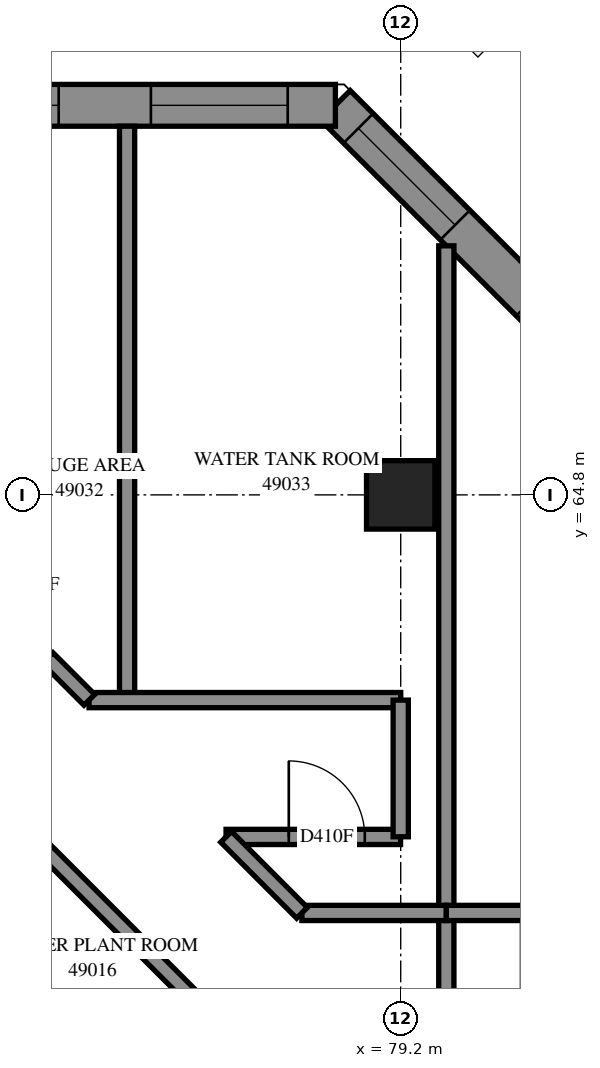
"""IFC4 building model, lengths in metres.
Left out: names, types, materials, properties, quantities, classifications, styles, units other than length and angle.
Written with IfcOpenShell. Run it as: python <this file> out.ifc"""

import sys

from ifc_helpers import new_model, si_unit, direction, frame, frame_2d, origin, origin_2d, place, context, subcontext, project, spatial, polyline, rectangle, outline, extrude, element, fill, save


model = new_model("IFC4")
c1 = context("Model", 3, precision=1e-05, world=origin(), true_north=direction((0.0, 1.0)))
c2 = subcontext(c1, "Body", "Model", "MODEL_VIEW")
j1 = project(units=[si_unit("LENGTHUNIT", "METRE"), si_unit("PLANEANGLEUNIT", "RADIAN")], contexts=[c1])
p1 = place(None, origin())
s1 = spatial("IfcSite", under=j1, at=p1, CompositionType="ELEMENT")
p2 = place(p1, origin())
s2 = spatial("IfcBuilding", under=s1, at=p2, CompositionType="ELEMENT")
p3 = place(p2, frame((0.0, 0.0, 180.4)))
s3 = spatial("IfcBuildingStorey", under=s2, at=p3, CompositionType="ELEMENT", Elevation=180.4)
p4 = place(p3, frame((79.2, 64.8, 0.0), z_axis=(0.0, 0.0, 1.0), x_axis=(1.0, 0.0, 0.0)))
e1 = element("IfcColumn", 1, at=p4, inside=s3, PredefinedType="COLUMN", context=c2, shape_type="SweptSolid", body=[
    extrude(rectangle(XDim=0.9, YDim=0.9, at=origin_2d()), origin(), (0.0, 0.0, 1.0), 4.7),
])
p5 = place(p3, frame((76.46, 49.284, -0.3), z_axis=(0.0, 0.0, 1.0), x_axis=(0.7071067812, 0.7071067812, 0.0)))
e2 = element("IfcWall", 2, at=p5, inside=s3, PredefinedType="SHEAR", context=c2, shape_type="SweptSolid", body=[
    extrude(rectangle(XDim=14.4, YDim=0.55, at=frame_2d((7.2, 0.0))), origin(), (0.0, 0.0, 1.0), 4.3),
])
p6 = place(p5, frame((4.55, 0.0, 0.3)))
e3 = element("IfcOpeningElement", 3, at=p6, cuts=e2, PredefinedType="OPENING", context=c2, shape_type="SweptSolid", body=[
    extrude(rectangle(XDim=1.1, YDim=2.1, at=frame_2d((0.55, 1.05))), frame((0.0, 0.285, 0.0), z_axis=(0.0, -1.0, 0.0), x_axis=(1.0, 0.0, 0.0)), (0.0, 0.0, 1.0), 0.57),
])
p7 = place(p5, frame((11.35, 0.0, 0.3)))
e4 = element("IfcOpeningElement", 4, at=p7, cuts=e2, PredefinedType="OPENING", context=c2, shape_type="SweptSolid", body=[
    extrude(rectangle(XDim=1.1, YDim=2.1, at=frame_2d((0.55, 1.05))), frame((0.0, 0.285, 0.0), z_axis=(0.0, -1.0, 0.0), x_axis=(1.0, 0.0, 0.0)), (0.0, 0.0, 1.0), 0.57),
])
p8 = place(p3, frame((100.024, 48.241, 0.0), z_axis=(0.0, 0.0, 1.0), x_axis=(-0.7071067812, 0.7071067812, 0.0)))
e5 = element("IfcWall", 5, at=p8, inside=s3, PredefinedType="SOLIDWALL", context=c2, shape_type="SweptSolid", body=[
    extrude(outline(polyline([(-0.275, -0.275), (30.779, -0.275), (30.552, 0.275), (0.275, 0.275), (-0.275, -0.275)])), origin(), (0.0, 0.0, 1.0), 4.7),
])
p9 = place(p8, frame((3.625, 0.0, 0.9)))
e6 = element("IfcOpeningElement", 6, at=p9, cuts=e5, PredefinedType="OPENING", context=c2, shape_type="SweptSolid", body=[
    extrude(rectangle(XDim=1.8, YDim=3.6, at=frame_2d((0.9, 1.8))), frame((0.0, 0.285, 0.0), z_axis=(0.0, -1.0, 0.0), x_axis=(1.0, 0.0, 0.0)), (0.0, 0.0, 1.0), 0.57),
])
p10 = place(p8, frame((7.225, 0.0, 0.9)))
e7 = element("IfcOpeningElement", 7, at=p10, cuts=e5, PredefinedType="OPENING", context=c2, shape_type="SweptSolid", body=[
    extrude(rectangle(XDim=1.8, YDim=3.6, at=frame_2d((0.9, 1.8))), frame((0.0, 0.285, 0.0), z_axis=(0.0, -1.0, 0.0), x_axis=(1.0, 0.0, 0.0)), (0.0, 0.0, 1.0), 0.57),
])
p11 = place(p8, frame((10.825, 0.0, 0.9)))
e8 = element("IfcOpeningElement", 8, at=p11, cuts=e5, PredefinedType="OPENING", context=c2, shape_type="SweptSolid", body=[
    extrude(rectangle(XDim=1.8, YDim=3.6, at=frame_2d((0.9, 1.8))), frame((0.0, 0.285, 0.0), z_axis=(0.0, -1.0, 0.0), x_axis=(1.0, 0.0, 0.0)), (0.0, 0.0, 1.0), 0.57),
])
p12 = place(p8, frame((14.425, 0.0, 0.9)))
e9 = element("IfcOpeningElement", 9, at=p12, cuts=e5, PredefinedType="OPENING", context=c2, shape_type="SweptSolid", body=[
    extrude(rectangle(XDim=1.8, YDim=3.6, at=frame_2d((0.9, 1.8))), frame((0.0, 0.285, 0.0), z_axis=(0.0, -1.0, 0.0), x_axis=(1.0, 0.0, 0.0)), (0.0, 0.0, 1.0), 0.57),
])
p13 = place(p8, frame((17.575, 0.0, 0.9)))
e10 = element("IfcOpeningElement", 10, at=p13, cuts=e5, PredefinedType="OPENING", context=c2, shape_type="SweptSolid", body=[
    extrude(rectangle(XDim=1.8, YDim=3.6, at=frame_2d((0.9, 1.8))), frame((0.0, 0.285, 0.0), z_axis=(0.0, -1.0, 0.0), x_axis=(1.0, 0.0, 0.0)), (0.0, 0.0, 1.0), 0.57),
])
p14 = place(p8, frame((21.625, 0.0, 0.9)))
e11 = element("IfcOpeningElement", 11, at=p14, cuts=e5, PredefinedType="OPENING", context=c2, shape_type="SweptSolid", body=[
    extrude(rectangle(XDim=1.8, YDim=3.6, at=frame_2d((0.9, 1.8))), frame((0.0, 0.285, 0.0), z_axis=(0.0, -1.0, 0.0), x_axis=(1.0, 0.0, 0.0)), (0.0, 0.0, 1.0), 0.57),
])
p15 = place(p8, frame((25.225, 0.0, 0.9)))
e12 = element("IfcOpeningElement", 12, at=p15, cuts=e5, PredefinedType="OPENING", context=c2, shape_type="SweptSolid", body=[
    extrude(rectangle(XDim=1.8, YDim=3.6, at=frame_2d((0.9, 1.8))), frame((0.0, 0.285, 0.0), z_axis=(0.0, -1.0, 0.0), x_axis=(1.0, 0.0, 0.0)), (0.0, 0.0, 1.0), 0.57),
])
p16 = place(p8, frame((28.438, 0.0, 0.9)))
e13 = element("IfcOpeningElement", 13, at=p16, cuts=e5, PredefinedType="OPENING", context=c2, shape_type="SweptSolid", body=[
    extrude(rectangle(XDim=1.8, YDim=3.6, at=frame_2d((0.9, 1.8))), frame((0.0, 0.285, 0.0), z_axis=(0.0, -1.0, 0.0), x_axis=(1.0, 0.0, 0.0)), (0.0, 0.0, 1.0), 0.57),
])
p17 = place(p3, frame((78.341, 69.925, 0.0), z_axis=(0.0, 0.0, 1.0), x_axis=(-1.0, 0.0, 0.0)))
e14 = element("IfcWall", 14, at=p17, inside=s3, PredefinedType="SOLIDWALL", context=c2, shape_type="SweptSolid", body=[
    extrude(outline(polyline([(-0.114, -0.275), (54.941, -0.275), (54.391, 0.275), (0.114, 0.275), (-0.114, -0.275)])), origin(), (0.0, 0.0, 1.0), 4.7),
])
p18 = place(p17, frame((0.627, 0.0, 0.9)))
e15 = element("IfcOpeningElement", 15, at=p18, cuts=e14, PredefinedType="OPENING", context=c2, shape_type="SweptSolid", body=[
    extrude(rectangle(XDim=1.8, YDim=3.6, at=frame_2d((0.9, 1.8))), frame((0.0, 0.285, 0.0), z_axis=(0.0, -1.0, 0.0), x_axis=(1.0, 0.0, 0.0)), (0.0, 0.0, 1.0), 0.57),
])
p19 = place(p17, frame((3.64, 0.0, 0.9)))
e16 = element("IfcOpeningElement", 16, at=p19, cuts=e14, PredefinedType="OPENING", context=c2, shape_type="SweptSolid", body=[
    extrude(rectangle(XDim=1.8, YDim=3.6, at=frame_2d((0.9, 1.8))), frame((0.0, 0.285, 0.0), z_axis=(0.0, -1.0, 0.0), x_axis=(1.0, 0.0, 0.0)), (0.0, 0.0, 1.0), 0.57),
])
p20 = place(p17, frame((7.24, 0.0, 0.9)))
e17 = element("IfcOpeningElement", 17, at=p20, cuts=e14, PredefinedType="OPENING", context=c2, shape_type="SweptSolid", body=[
    extrude(rectangle(XDim=1.8, YDim=3.6, at=frame_2d((0.9, 1.8))), frame((0.0, 0.285, 0.0), z_axis=(0.0, -1.0, 0.0), x_axis=(1.0, 0.0, 0.0)), (0.0, 0.0, 1.0), 0.57),
])
p21 = place(p17, frame((10.841, 0.0, 0.9)))
e18 = element("IfcOpeningElement", 18, at=p21, cuts=e14, PredefinedType="OPENING", context=c2, shape_type="SweptSolid", body=[
    extrude(rectangle(XDim=1.8, YDim=3.6, at=frame_2d((0.9, 1.8))), frame((0.0, 0.285, 0.0), z_axis=(0.0, -1.0, 0.0), x_axis=(1.0, 0.0, 0.0)), (0.0, 0.0, 1.0), 0.57),
])
p22 = place(p17, frame((14.441, 0.0, 0.9)))
e19 = element("IfcOpeningElement", 19, at=p22, cuts=e14, PredefinedType="OPENING", context=c2, shape_type="SweptSolid", body=[
    extrude(rectangle(XDim=1.8, YDim=3.6, at=frame_2d((0.9, 1.8))), frame((0.0, 0.285, 0.0), z_axis=(0.0, -1.0, 0.0), x_axis=(1.0, 0.0, 0.0)), (0.0, 0.0, 1.0), 0.57),
])
p23 = place(p17, frame((18.041, 0.0, 0.9)))
e20 = element("IfcOpeningElement", 20, at=p23, cuts=e14, PredefinedType="OPENING", context=c2, shape_type="SweptSolid", body=[
    extrude(rectangle(XDim=1.8, YDim=3.6, at=frame_2d((0.9, 1.8))), frame((0.0, 0.285, 0.0), z_axis=(0.0, -1.0, 0.0), x_axis=(1.0, 0.0, 0.0)), (0.0, 0.0, 1.0), 0.57),
])
p24 = place(p17, frame((21.64, 0.0, 0.9)))
e21 = element("IfcOpeningElement", 21, at=p24, cuts=e14, PredefinedType="OPENING", context=c2, shape_type="SweptSolid", body=[
    extrude(rectangle(XDim=1.8, YDim=3.6, at=frame_2d((0.9, 1.8))), frame((0.0, 0.285, 0.0), z_axis=(0.0, -1.0, 0.0), x_axis=(1.0, 0.0, 0.0)), (0.0, 0.0, 1.0), 0.57),
])
p25 = place(p17, frame((25.241, 0.0, 0.9)))
e22 = element("IfcOpeningElement", 22, at=p25, cuts=e14, PredefinedType="OPENING", context=c2, shape_type="SweptSolid", body=[
    extrude(rectangle(XDim=1.8, YDim=3.6, at=frame_2d((0.9, 1.8))), frame((0.0, 0.285, 0.0), z_axis=(0.0, -1.0, 0.0), x_axis=(1.0, 0.0, 0.0)), (0.0, 0.0, 1.0), 0.57),
])
p26 = place(p17, frame((28.84, 0.0, 0.9)))
e23 = element("IfcOpeningElement", 23, at=p26, cuts=e14, PredefinedType="OPENING", context=c2, shape_type="SweptSolid", body=[
    extrude(rectangle(XDim=1.8, YDim=3.6, at=frame_2d((0.9, 1.8))), frame((0.0, 0.285, 0.0), z_axis=(0.0, -1.0, 0.0), x_axis=(1.0, 0.0, 0.0)), (0.0, 0.0, 1.0), 0.57),
])
p27 = place(p17, frame((32.441, 0.0, 0.9)))
e24 = element("IfcOpeningElement", 24, at=p27, cuts=e14, PredefinedType="OPENING", context=c2, shape_type="SweptSolid", body=[
    extrude(rectangle(XDim=1.8, YDim=3.6, at=frame_2d((0.9, 1.8))), frame((0.0, 0.285, 0.0), z_axis=(0.0, -1.0, 0.0), x_axis=(1.0, 0.0, 0.0)), (0.0, 0.0, 1.0), 0.57),
])
p28 = place(p17, frame((36.041, 0.0, 0.9)))
e25 = element("IfcOpeningElement", 25, at=p28, cuts=e14, PredefinedType="OPENING", context=c2, shape_type="SweptSolid", body=[
    extrude(rectangle(XDim=1.8, YDim=3.6, at=frame_2d((0.9, 1.8))), frame((0.0, 0.285, 0.0), z_axis=(0.0, -1.0, 0.0), x_axis=(1.0, 0.0, 0.0)), (0.0, 0.0, 1.0), 0.57),
])
p29 = place(p17, frame((39.641, 0.0, 0.9)))
e26 = element("IfcOpeningElement", 26, at=p29, cuts=e14, PredefinedType="OPENING", context=c2, shape_type="SweptSolid", body=[
    extrude(rectangle(XDim=1.8, YDim=3.6, at=frame_2d((0.9, 1.8))), frame((0.0, 0.285, 0.0), z_axis=(0.0, -1.0, 0.0), x_axis=(1.0, 0.0, 0.0)), (0.0, 0.0, 1.0), 0.57),
])
p30 = place(p17, frame((43.24, 0.0, 0.9)))
e27 = element("IfcOpeningElement", 27, at=p30, cuts=e14, PredefinedType="OPENING", context=c2, shape_type="SweptSolid", body=[
    extrude(rectangle(XDim=1.8, YDim=3.6, at=frame_2d((0.9, 1.8))), frame((0.0, 0.285, 0.0), z_axis=(0.0, -1.0, 0.0), x_axis=(1.0, 0.0, 0.0)), (0.0, 0.0, 1.0), 0.57),
])
p31 = place(p17, frame((46.84, 0.0, 0.9)))
e28 = element("IfcOpeningElement", 28, at=p31, cuts=e14, PredefinedType="OPENING", context=c2, shape_type="SweptSolid", body=[
    extrude(rectangle(XDim=1.8, YDim=3.6, at=frame_2d((0.9, 1.8))), frame((0.0, 0.285, 0.0), z_axis=(0.0, -1.0, 0.0), x_axis=(1.0, 0.0, 0.0)), (0.0, 0.0, 1.0), 0.57),
])
p32 = place(p17, frame((50.441, 0.0, 0.9)))
e29 = element("IfcOpeningElement", 29, at=p32, cuts=e14, PredefinedType="OPENING", context=c2, shape_type="SweptSolid", body=[
    extrude(rectangle(XDim=1.8, YDim=3.6, at=frame_2d((0.9, 1.8))), frame((0.0, 0.285, 0.0), z_axis=(0.0, -1.0, 0.0), x_axis=(1.0, 0.0, 0.0)), (0.0, 0.0, 1.0), 0.57),
])
p33 = place(p3, frame((102.747, 49.938, 0.0), z_axis=(0.0, 0.0, 1.0), x_axis=(-0.7071083109, 0.7071052514, 0.0)))
e30 = element("IfcWall", 30, at=p33, inside=s3, PredefinedType="SOLIDWALL", context=c2, shape_type="SweptSolid", body=[
    extrude(outline(polyline([(-0.1, -0.1), (32.726, -0.1), (32.644, 0.1), (0.1, 0.1), (-0.1, -0.1)])), origin(), (0.0, 0.0, 1.0), 4.7),
])
p34 = place(p3, frame((79.8, 59.3, 0.0), z_axis=(0.0, 0.0, 1.0), x_axis=(0.0, 1.0, 0.0)))
e31 = element("IfcWall", 31, at=p34, inside=s3, PredefinedType="PARTITIONING", context=c2, shape_type="SweptSolid", body=[
    extrude(rectangle(XDim=8.777, YDim=0.2, at=frame_2d((4.388, 0.0))), origin(), (0.0, 0.0, 1.0), 4.7),
])
p35 = place(p3, frame((75.6, 62.1, 0.0), z_axis=(0.0, 0.0, 1.0), x_axis=(0.0, 1.0, 0.0)))
e32 = element("IfcWall", 32, at=p35, inside=s3, PredefinedType="PARTITIONING", context=c2, shape_type="SweptSolid", body=[
    extrude(rectangle(XDim=7.55, YDim=0.2, at=frame_2d((3.775, 0.0))), origin(), (0.0, 0.0, 1.0), 4.7),
])
p36 = place(p3, frame((74.349, 60.299, 0.0), z_axis=(0.0, 0.0, 1.0), x_axis=(0.7071067812, -0.7071067812, 0.0)))
e33 = element("IfcWall", 33, at=p36, inside=s3, PredefinedType="PARTITIONING", context=c2, shape_type="SweptSolid", body=[
    extrude(rectangle(XDim=4.452, YDim=0.2, at=frame_2d((2.226, 0.0))), origin(), (0.0, 0.0, 1.0), 4.7),
])
p37 = place(p3, frame((75.1, 62.1, 0.0), z_axis=(0.0, 0.0, 1.0), x_axis=(1.0, 0.0, 0.0)))
e34 = element("IfcWall", 34, at=p37, inside=s3, PredefinedType="PARTITIONING", context=c2, shape_type="SweptSolid", body=[
    extrude(rectangle(XDim=4.1, YDim=0.2, at=frame_2d((2.05, 0.0))), origin(), (0.0, 0.0, 1.0), 4.7),
])
p38 = place(p3, frame((79.8, 55.844, 0.0), z_axis=(0.0, 0.0, 1.0), x_axis=(0.0, 1.0, 0.0)))
e35 = element("IfcWall", 35, at=p38, inside=s3, PredefinedType="PARTITIONING", context=c2, shape_type="SweptSolid", body=[
    extrude(rectangle(XDim=3.456, YDim=0.2, at=frame_2d((1.728, 0.0))), origin(), (0.0, 0.0, 1.0), 4.7),
])
p39 = place(p3, frame((76.902, 60.3, 0.0), z_axis=(0.0, 0.0, 1.0), x_axis=(1.0, 0.0, 0.0)))
e36 = element("IfcWall", 36, at=p39, inside=s3, PredefinedType="PARTITIONING", context=c2, shape_type="SweptSolid", body=[
    extrude(rectangle(XDim=2.296, YDim=0.2, at=frame_2d((1.148, 0.0))), origin(), (0.0, 0.0, 1.0), 4.7),
])
p40 = place(p39, frame((0.825, 0.0, 0.0)))
e37 = element("IfcOpeningElement", 37, at=p40, cuts=e36, PredefinedType="OPENING", context=c2, shape_type="SweptSolid", body=[
    extrude(rectangle(XDim=1.0, YDim=2.1, at=frame_2d((0.5, 1.05))), frame((0.0, 0.11, 0.0), z_axis=(0.0, -1.0, 0.0), x_axis=(1.0, 0.0, 0.0)), (0.0, 0.0, 1.0), 0.22),
])
p41 = place(p3, frame((77.9, 59.3, 0.0), z_axis=(0.0, 0.0, 1.0), x_axis=(1.0, 0.0, 0.0)))
e38 = element("IfcWall", 38, at=p41, inside=s3, PredefinedType="PARTITIONING", context=c2, shape_type="SweptSolid", body=[
    extrude(rectangle(XDim=1.9, YDim=0.2, at=frame_2d((0.95, 0.0))), origin(), (0.0, 0.0, 1.0), 4.7),
])
p42 = place(p3, frame((79.2, 60.302, 0.0), z_axis=(0.0, 0.0, 1.0), x_axis=(0.0, 1.0, 0.0)))
e39 = element("IfcWall", 39, at=p42, inside=s3, PredefinedType="PARTITIONING", context=c2, shape_type="SweptSolid", body=[
    extrude(rectangle(XDim=1.798, YDim=0.2, at=frame_2d((0.899, 0.0))), origin(), (0.0, 0.0, 1.0), 4.7),
])
p43 = place(p3, frame((76.903, 60.301, 0.0), z_axis=(0.0, 0.0, 1.0), x_axis=(0.7063986127, -0.7078142412, 0.0)))
e40 = element("IfcWall", 40, at=p43, inside=s3, PredefinedType="PARTITIONING", context=c2, shape_type="SweptSolid", body=[
    extrude(rectangle(XDim=1.413, YDim=0.2, at=frame_2d((0.706, 0.0))), origin(), (0.0, 0.0, 1.0), 4.7),
])
p44 = place(p3, frame((79.8, 59.3, 0.0), z_axis=(0.0, 0.0, 1.0), x_axis=(1.0, 0.0, 0.0)))
e41 = element("IfcWall", 41, at=p44, inside=s3, PredefinedType="PARTITIONING", context=c2, shape_type="SweptSolid", body=[
    extrude(rectangle(XDim=1.098, YDim=0.2, at=frame_2d((0.549, 0.0))), origin(), (0.0, 0.0, 1.0), 4.7),
])
p45 = place(p3, frame((74.553, 62.654, 0.0), z_axis=(0.0, 0.0, 1.0), x_axis=(0.7071067812, -0.7071067812, 0.0)))
e42 = element("IfcWall", 42, at=p45, inside=s3, PredefinedType="PARTITIONING", context=c2, shape_type="SweptSolid", body=[
    extrude(rectangle(XDim=0.778, YDim=0.2, at=frame_2d((0.389, 0.0))), origin(), (0.0, 0.0, 1.0), 4.7),
])
p46 = place(p16, origin())
e43 = element("IfcWindow", 43, at=p46, inside=s3, PartitioningType="SINGLE_PANEL", PredefinedType="WINDOW", context=c2, shape_type="SweptSolid", body=[
    extrude(rectangle(XDim=1.8, YDim=3.6, at=frame_2d((0.9, 1.8))), frame((0.0, 0.155, 0.0), z_axis=(0.0, -1.0, 0.0), x_axis=(1.0, 0.0, 0.0)), (0.0, 0.0, 1.0), 0.06),
])
fill(e13, e43)
p47 = place(p18, origin())
e44 = element("IfcWindow", 44, at=p47, inside=s3, PartitioningType="SINGLE_PANEL", PredefinedType="WINDOW", context=c2, shape_type="SweptSolid", body=[
    extrude(rectangle(XDim=1.8, YDim=3.6, at=frame_2d((0.9, 1.8))), frame((0.0, 0.155, 0.0), z_axis=(0.0, -1.0, 0.0), x_axis=(1.0, 0.0, 0.0)), (0.0, 0.0, 1.0), 0.06),
])
fill(e15, e44)
p48 = place(p19, origin())
e45 = element("IfcWindow", 45, at=p48, inside=s3, PartitioningType="SINGLE_PANEL", PredefinedType="WINDOW", context=c2, shape_type="SweptSolid", body=[
    extrude(rectangle(XDim=1.8, YDim=3.6, at=frame_2d((0.9, 1.8))), frame((0.0, 0.155, 0.0), z_axis=(0.0, -1.0, 0.0), x_axis=(1.0, 0.0, 0.0)), (0.0, 0.0, 1.0), 0.06),
])
fill(e16, e45)
p49 = place(p40, origin())
e46 = element("IfcDoor", 46, at=p49, inside=s3, OperationType="SINGLE_SWING_LEFT", PredefinedType="DOOR", context=c2, shape_type="SweptSolid", body=[
    extrude(rectangle(XDim=1.0, YDim=2.1, at=frame_2d((0.5, 1.05))), frame((0.0, 0.025, 0.0), z_axis=(0.0, -1.0, 0.0), x_axis=(1.0, 0.0, 0.0)), (0.0, 0.0, 1.0), 0.05),
])
fill(e37, e46)
save(model, sys.argv[1])
